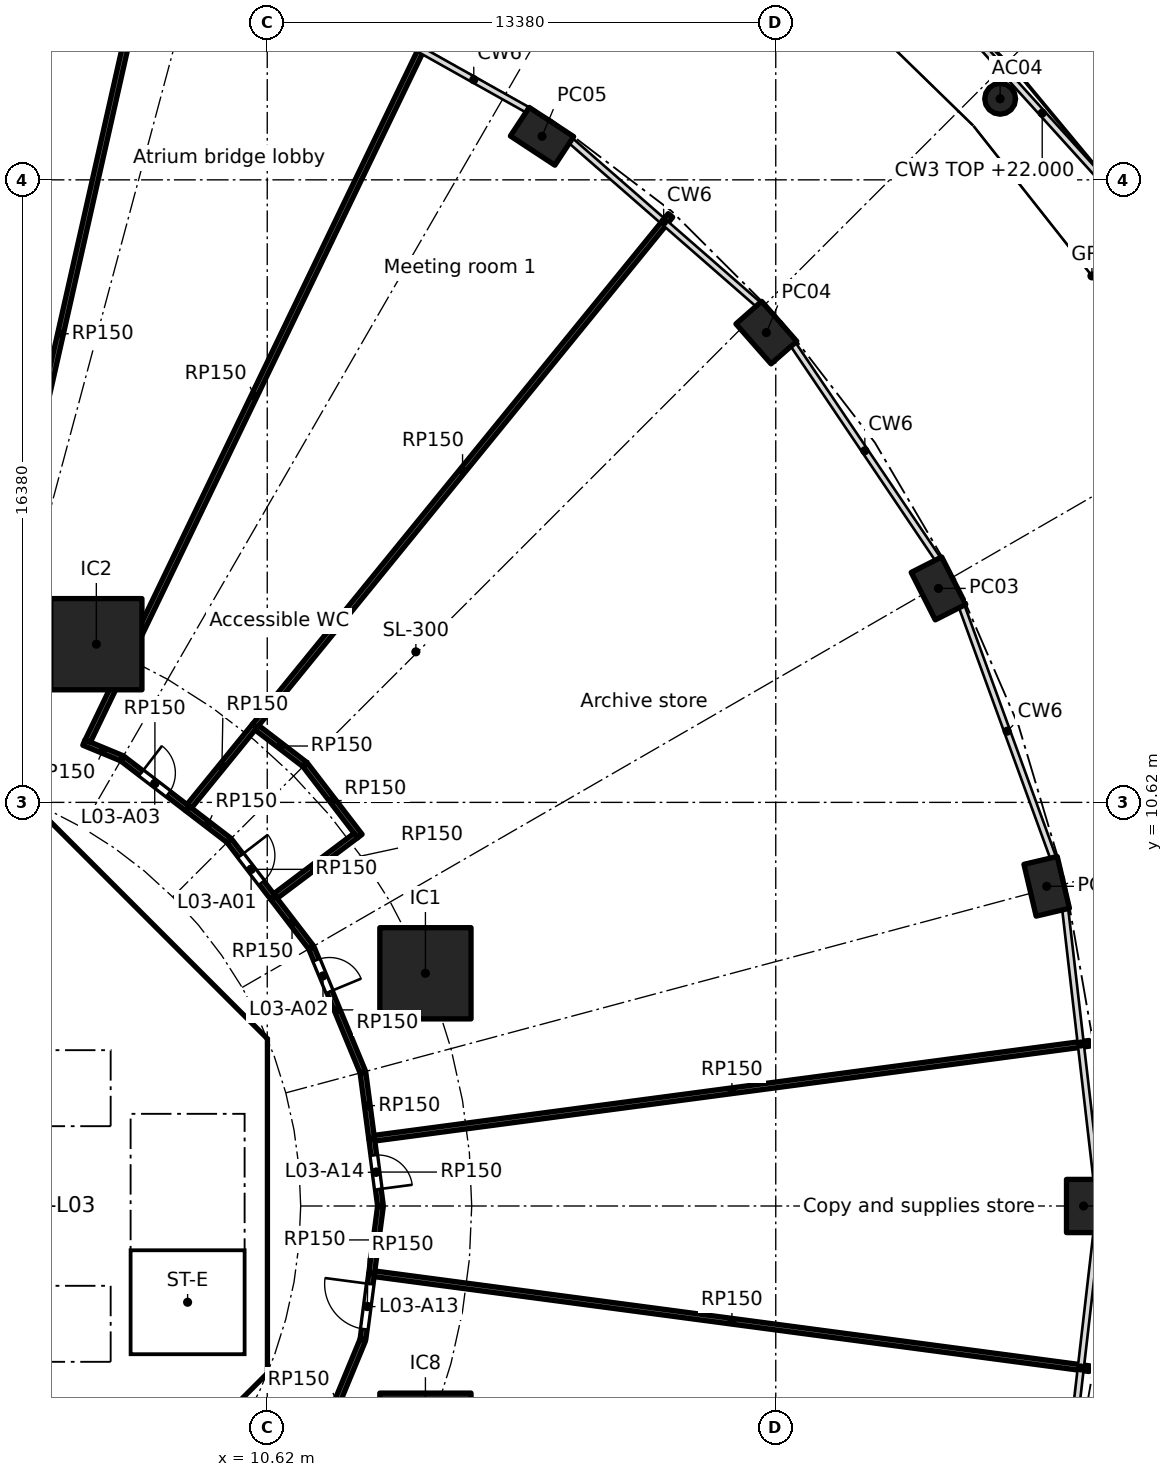
"""IFC4 building model, lengths in metres.
Left out: names, types, materials, properties, quantities, classifications, styles, units other than length and angle.
Written with IfcOpenShell. Run it as: python <this file> out.ifc"""

import sys

from ifc_helpers import new_model, si_unit, direction, frame, frame_2d, origin, origin_2d, place, context, subcontext, project, spatial, polyline, rectangle, hollow_rectangle, hollow_circle, outline, extrude, element, fill, save


model = new_model("IFC4")
c1 = context("Model", 3, precision=1e-05, world=origin(), true_north=direction((0.0, 1.0)))
c2 = subcontext(c1, "Body", "Model", "MODEL_VIEW")
j1 = project(units=[si_unit("LENGTHUNIT", "METRE"), si_unit("PLANEANGLEUNIT", "RADIAN")], contexts=[c1])
p1 = place(None, origin())
s1 = spatial("IfcSite", under=j1, at=p1, CompositionType="ELEMENT")
p2 = place(p1, origin())
s2 = spatial("IfcBuilding", under=s1, at=p2, CompositionType="ELEMENT")
p3 = place(p2, frame((0.0, 0.0, 17.0)))
s3 = spatial("IfcBuildingStorey", under=s2, at=p3, CompositionType="ELEMENT", Elevation=17.0)
for number, where, z_axis, x_axis in (
    (1, (32.1, 0.0, 0.0), (0.0, 0.0, 1.0), (0.0, 1.0, 0.0)),
    (2, (31.129, 8.412, 0.0), (0.0, 0.0, 1.0), (-0.229, 0.973, 0.0)),
    (3, (28.282, 16.25, 0.0), (0.0, 0.0, 1.0), (-0.452, 0.892, 0.0)),
    (4, (23.752, 22.981, 0.0), (0.0, 0.0, 1.0), (-0.66, 0.751, 0.0)),
    (5, (17.85, 28.146, 0.0), (0.0, 0.0, 1.0), (-0.836, 0.549, 0.0)),
):
    element("IfcColumn", number, at=place(p3, frame(where, z_axis=z_axis, x_axis=x_axis)), inside=s3, PredefinedType="COLUMN", context=c2, shape_type="SweptSolid", body=[
        extrude(hollow_rectangle(XDim=1.4, YDim=0.9, WallThickness=0.05, at=origin_2d()), origin(), (0.0, 0.0, 1.0), 5.0),
    ])
for number, where, z_axis, x_axis in (
    (6, (14.782, 6.123, 0.0), (0.0, 0.0, 1.0), (1.0, 0.0, 0.0)),
    (7, (6.123, 14.782, 0.0), (0.0, 0.0, 1.0), (1.0, 0.0, 0.0)),
    (8, (14.782, -6.123, 0.0), (0.0, 0.0, 1.0), (1.0, 0.0, 0.0)),
):
    element("IfcColumn", number, at=place(p3, frame(where, z_axis=z_axis, x_axis=x_axis)), inside=s3, PredefinedType="COLUMN", context=c2, shape_type="SweptSolid", body=[
        extrude(rectangle(XDim=2.4, YDim=2.4, at=origin_2d()), origin(), (0.0, 0.0, 1.0), 5.0),
    ])
p4 = place(p3, frame((29.904, 29.133, 0.0), z_axis=(0.0, 0.0, 1.0), x_axis=(1.0, 0.0, 0.0)))
e9 = element("IfcColumn", 9, at=p4, inside=s3, PredefinedType="COLUMN", context=c2, shape_type="SweptSolid", body=[
    extrude(hollow_circle(Radius=0.406, WallThickness=0.025, at=origin_2d()), origin(), (0.0, 0.0, 1.0), 5.0),
])
p5 = place(p3, frame((9.988, 4.613, 0.0), z_axis=(0.0, 0.0, 1.0), x_axis=(-0.707106781187, 0.707106781187, 0.0)))
e10 = element("IfcWall", 10, at=p5, inside=s3, PredefinedType="SHEAR", context=c2, shape_type="SweptSolid", body=[
    extrude(rectangle(XDim=7.602, YDim=0.6, at=frame_2d((3.801, 0.0))), origin(), (0.0, 0.0, 1.0), 4.7),
])
p6 = place(p5, frame((3.201, 0.0, 0.0)))
e11 = element("IfcOpeningElement", 11, at=p6, cuts=e10, PredefinedType="OPENING", context=c2, shape_type="SweptSolid", body=[
    extrude(rectangle(XDim=1.2, YDim=2.1, at=frame_2d((0.6, 1.05))), frame((0.0, 0.31, 0.0), z_axis=(0.0, -1.0, 0.0), x_axis=(1.0, 0.0, 0.0)), (0.0, 0.0, 1.0), 0.62),
])
p7 = place(p3, frame((4.613, -9.988, 0.0), z_axis=(0.0, 0.0, 1.0), x_axis=(0.707106781187, 0.707106781187, 0.0)))
e12 = element("IfcWall", 12, at=p7, inside=s3, PredefinedType="SHEAR", context=c2, shape_type="SweptSolid", body=[
    extrude(rectangle(XDim=7.602, YDim=0.6, at=frame_2d((3.801, 0.0))), origin(), (0.0, 0.0, 1.0), 4.7),
])
p8 = place(p7, frame((3.201, 0.0, 0.0)))
e13 = element("IfcOpeningElement", 13, at=p8, cuts=e12, PredefinedType="OPENING", context=c2, shape_type="SweptSolid", body=[
    extrude(rectangle(XDim=1.2, YDim=2.1, at=frame_2d((0.6, 1.05))), frame((0.0, 0.31, 0.0), z_axis=(0.0, -1.0, 0.0), x_axis=(1.0, 0.0, 0.0)), (0.0, 0.0, 1.0), 0.62),
])
p9 = place(p3, frame((-6.7, 2.0, 0.0), z_axis=(0.0, 0.0, 1.0), x_axis=(1.0, 0.0, 0.0)))
e14 = element("IfcWall", 14, at=p9, inside=s3, PredefinedType="SOLIDWALL", context=c2, shape_type="SweptSolid", body=[
    extrude(rectangle(XDim=13.4, YDim=0.2, at=frame_2d((6.7, 0.0))), origin(), (0.0, 0.0, 1.0), 4.7),
])
p10 = place(p9, frame((0.65, 0.0, 0.0)))
e15 = element("IfcOpeningElement", 15, at=p10, cuts=e14, PredefinedType="OPENING", context=c2, shape_type="SweptSolid", body=[
    extrude(rectangle(XDim=1.1, YDim=2.1, at=frame_2d((0.55, 1.05))), frame((0.0, 0.11, 0.0), z_axis=(0.0, -1.0, 0.0), x_axis=(1.0, 0.0, 0.0)), (0.0, 0.0, 1.0), 0.22),
])
p11 = place(p9, frame((2.85, 0.0, 0.0)))
e16 = element("IfcOpeningElement", 16, at=p11, cuts=e14, PredefinedType="OPENING", context=c2, shape_type="SweptSolid", body=[
    extrude(rectangle(XDim=1.1, YDim=2.1, at=frame_2d((0.55, 1.05))), frame((0.0, 0.11, 0.0), z_axis=(0.0, -1.0, 0.0), x_axis=(1.0, 0.0, 0.0)), (0.0, 0.0, 1.0), 0.22),
])
p12 = place(p9, frame((5.05, 0.0, 0.0)))
e17 = element("IfcOpeningElement", 17, at=p12, cuts=e14, PredefinedType="OPENING", context=c2, shape_type="SweptSolid", body=[
    extrude(rectangle(XDim=1.1, YDim=2.1, at=frame_2d((0.55, 1.05))), frame((0.0, 0.11, 0.0), z_axis=(0.0, -1.0, 0.0), x_axis=(1.0, 0.0, 0.0)), (0.0, 0.0, 1.0), 0.22),
])
p13 = place(p3, frame((6.7, 4.0, 0.0), z_axis=(0.0, 0.0, 1.0), x_axis=(1.0, 0.0, 0.0)))
e18 = element("IfcWall", 18, at=p13, inside=s3, PredefinedType="SOLIDWALL", context=c2, shape_type="SweptSolid", body=[
    extrude(rectangle(XDim=3.325, YDim=0.2, at=frame_2d((1.662, 0.0))), origin(), (0.0, 0.0, 1.0), 4.7),
])
p14 = place(p13, frame((1.25, 0.0, 0.0)))
e19 = element("IfcOpeningElement", 19, at=p14, cuts=e18, PredefinedType="OPENING", context=c2, shape_type="SweptSolid", body=[
    extrude(rectangle(XDim=1.1, YDim=2.1, at=frame_2d((0.55, 1.05))), frame((0.0, 0.11, 0.0), z_axis=(0.0, -1.0, 0.0), x_axis=(1.0, 0.0, 0.0)), (0.0, 0.0, 1.0), 0.22),
])
p15 = place(p3, frame((-6.7, -2.0, 0.0), z_axis=(0.0, 0.0, 1.0), x_axis=(1.0, 0.0, 0.0)))
e20 = element("IfcWall", 20, at=p15, inside=s3, PredefinedType="SOLIDWALL", context=c2, shape_type="SweptSolid", body=[
    extrude(rectangle(XDim=13.4, YDim=0.2, at=frame_2d((6.7, 0.0))), origin(), (0.0, 0.0, 1.0), 4.7),
])
p16 = place(p15, frame((0.65, 0.0, 0.0)))
e21 = element("IfcOpeningElement", 21, at=p16, cuts=e20, PredefinedType="OPENING", context=c2, shape_type="SweptSolid", body=[
    extrude(rectangle(XDim=1.1, YDim=2.1, at=frame_2d((0.55, 1.05))), frame((0.0, 0.11, 0.0), z_axis=(0.0, -1.0, 0.0), x_axis=(1.0, 0.0, 0.0)), (0.0, 0.0, 1.0), 0.22),
])
p17 = place(p15, frame((2.85, 0.0, 0.0)))
e22 = element("IfcOpeningElement", 22, at=p17, cuts=e20, PredefinedType="OPENING", context=c2, shape_type="SweptSolid", body=[
    extrude(rectangle(XDim=1.1, YDim=2.1, at=frame_2d((0.55, 1.05))), frame((0.0, 0.11, 0.0), z_axis=(0.0, -1.0, 0.0), x_axis=(1.0, 0.0, 0.0)), (0.0, 0.0, 1.0), 0.22),
])
p18 = place(p3, origin())
e23 = element("IfcWall", 23, at=p18, inside=s3, PredefinedType="SHEAR", context=c2, shape_type="SweptSolid", body=[
    extrude(outline(polyline([(9.776, -4.401), (10.025, -4.152), (10.025, -3.801), (10.025, 4.152), (9.776, 4.401), (10.2, 4.825), (10.625, 4.401), (10.625, -4.401), (10.2, -4.825), (9.776, -4.401)])), origin(), (0.0, 0.0, 1.0), 4.7),
])
p19 = place(p3, origin())
e24 = element("IfcWall", 24, at=p19, inside=s3, PredefinedType="SOLIDWALL", context=c2, shape_type="SweptSolid", body=[
    extrude(outline(polyline([(-6.7, -2.1), (-6.5, -2.1), (-6.5, -4.1), (-4.5, -4.1), (-4.5, -2.1), (-4.3, -2.1), (-4.3, -4.1), (-2.3, -4.1), (-2.3, -2.1), (-2.1, -2.1), (-2.1, -4.1), (-0.1, -4.1), (-0.1, -2.1), (0.1, -2.1), (0.1, -4.1), (2.1, -4.1), (2.1, -2.1), (2.3, -2.1), (2.3, -4.1), (4.3, -4.1), (4.3, -2.1), (4.5, -2.1), (4.5, -4.1), (6.5, -4.1), (6.5, -2.1), (6.7, -2.1), (6.7, -4.3), (-6.7, -4.3), (-6.7, -2.1)])), origin(), (0.0, 0.0, 1.0), 4.7),
])
p20 = place(p3, origin())
e25 = element("IfcWall", 25, at=p20, inside=s3, PredefinedType="SOLIDWALL", context=c2, shape_type="SweptSolid", body=[
    extrude(outline(polyline([(-6.5, 2.1), (-6.7, 2.1), (-6.7, 4.3), (6.7, 4.3), (6.7, 2.1), (6.5, 2.1), (6.5, 4.1), (4.5, 4.1), (4.5, 2.1), (4.3, 2.1), (4.3, 4.1), (2.3, 4.1), (2.3, 2.1), (2.1, 2.1), (2.1, 4.1), (0.1, 4.1), (0.1, 2.1), (-0.1, 2.1), (-0.1, 4.1), (-2.1, 4.1), (-2.1, 2.1), (-2.3, 2.1), (-2.3, 4.1), (-4.3, 4.1), (-4.3, 2.1), (-4.5, 2.1), (-4.5, 4.1), (-6.5, 4.1), (-6.5, 2.1)])), origin(), (0.0, 0.0, 1.0), 4.7),
])
p21 = place(p3, origin())
e26 = element("IfcWall", 26, at=p21, inside=s3, PredefinedType="SOLIDWALL", context=c2, shape_type="SweptSolid", body=[
    extrude(outline(polyline([(7.025, -3.9), (6.7, -3.9), (6.7, 3.9), (7.025, 3.9), (7.025, -3.9)])), origin(), (0.0, 0.0, 1.0), 4.7),
])
p22 = place(p3, origin())
e27 = element("IfcWall", 27, at=p22, inside=s3, PredefinedType="SOLIDWALL", context=c2, shape_type="SweptSolid", body=[
    extrude(outline(polyline([(10.025, -4.1), (6.7, -4.1), (6.7, -3.9), (10.025, -3.9), (10.025, -4.1)])), origin(), (0.0, 0.0, 1.0), 4.7),
])
p23 = place(p3, frame((2.998, 13.281, 0.0), z_axis=(0.0, 0.0, 1.0), x_axis=(0.220191699756, 0.975456618901, 0.0)))
e28 = element("IfcWall", 28, at=p23, inside=s3, PredefinedType="PARTITIONING", context=c2, shape_type="SweptSolid", body=[
    extrude(rectangle(XDim=19.825, YDim=0.15, at=frame_2d((9.912, 0.0))), origin(), (0.0, 0.0, 1.0), 4.7),
])
p24 = place(p3, frame((5.795, 12.194, 0.0), z_axis=(0.0, 0.0, 1.0), x_axis=(0.923867429555, -0.382712650179, 0.0)))
e29 = element("IfcWall", 29, at=p24, inside=s3, PredefinedType="PARTITIONING", context=c2, shape_type="SweptSolid", body=[
    extrude(rectangle(XDim=1.075, YDim=0.15, at=frame_2d((0.538, 0.0))), origin(), (0.0, 0.0, 1.0), 4.7),
])
p25 = place(p3, frame((6.809, 11.771, 0.0), z_axis=(0.0, 0.0, 1.0), x_axis=(0.793372937326, -0.608735888805, 0.0)))
e30 = element("IfcWall", 30, at=p25, inside=s3, PredefinedType="PARTITIONING", context=c2, shape_type="SweptSolid", body=[
    extrude(rectangle(XDim=2.155, YDim=0.15, at=frame_2d((1.078, 0.0))), origin(), (0.0, 0.0, 1.0), 4.7),
])
p26 = place(p25, frame((0.622, 0.0, 0.0)))
e31 = element("IfcOpeningElement", 31, at=p26, cuts=e30, PredefinedType="OPENING", context=c2, shape_type="SweptSolid", body=[
    extrude(rectangle(XDim=0.9, YDim=2.1, at=frame_2d((0.45, 1.05))), frame((0.0, 0.085, 0.0), z_axis=(0.0, -1.0, 0.0), x_axis=(1.0, 0.0, 0.0)), (0.0, 0.0, 1.0), 0.17),
])
p27 = place(p3, frame((8.519, 10.459, 0.0), z_axis=(0.0, 0.0, 1.0), x_axis=(0.793371316762, -0.6087380009, 0.0)))
e32 = element("IfcWall", 32, at=p27, inside=s3, PredefinedType="PARTITIONING", context=c2, shape_type="SweptSolid", body=[
    extrude(rectangle(XDim=1.371, YDim=0.15, at=frame_2d((0.686, 0.0))), origin(), (0.0, 0.0, 1.0), 4.7),
])
p28 = place(p3, frame((8.567, 10.517, 0.0), z_axis=(0.0, 0.0, 1.0), x_axis=(0.631573271363, 0.775316195432, 0.0)))
e33 = element("IfcWall", 33, at=p28, inside=s3, PredefinedType="PARTITIONING", context=c2, shape_type="SweptSolid", body=[
    extrude(rectangle(XDim=2.726, YDim=0.15, at=frame_2d((1.363, 0.0))), origin(), (0.0, 0.0, 1.0), 4.7),
])
p29 = place(p3, frame((9.624, 9.607, 0.0), z_axis=(0.0, 0.0, 1.0), x_axis=(0.608754453805, -0.793358692504, 0.0)))
e34 = element("IfcWall", 34, at=p29, inside=s3, PredefinedType="PARTITIONING", context=c2, shape_type="SweptSolid", body=[
    extrude(rectangle(XDim=1.888, YDim=0.15, at=frame_2d((0.944, 0.0))), origin(), (0.0, 0.0, 1.0), 4.7),
])
p30 = place(p29, frame((0.488, 0.0, 0.0)))
e35 = element("IfcOpeningElement", 35, at=p30, cuts=e34, PredefinedType="OPENING", context=c2, shape_type="SweptSolid", body=[
    extrude(rectangle(XDim=0.9, YDim=2.1, at=frame_2d((0.45, 1.05))), frame((0.0, 0.085, 0.0), z_axis=(0.0, -1.0, 0.0), x_axis=(1.0, 0.0, 0.0)), (0.0, 0.0, 1.0), 0.17),
])
p31 = place(p3, frame((10.348, 12.585, 0.0), z_axis=(0.0, 0.0, 1.0), x_axis=(0.793328373205, -0.608793965368, 0.0)))
e36 = element("IfcWall", 36, at=p31, inside=s3, PredefinedType="PARTITIONING", context=c2, shape_type="SweptSolid", body=[
    extrude(rectangle(XDim=1.584, YDim=0.15, at=frame_2d((0.792, 0.0))), origin(), (0.0, 0.0, 1.0), 4.7),
])
p32 = place(p3, frame((10.288, 12.631, 0.0), z_axis=(0.0, 0.0, 1.0), x_axis=(0.631546535922, 0.77533797338, 0.0)))
e37 = element("IfcWall", 37, at=p32, inside=s3, PredefinedType="PARTITIONING", context=c2, shape_type="SweptSolid", body=[
    extrude(rectangle(XDim=17.325, YDim=0.15, at=frame_2d((8.663, 0.0))), origin(), (0.0, 0.0, 1.0), 4.7),
])
p33 = place(p3, frame((10.774, 8.109, 0.0), z_axis=(0.0, 0.0, 1.0), x_axis=(0.608716251771, -0.793388003961, 0.0)))
e38 = element("IfcWall", 38, at=p33, inside=s3, PredefinedType="PARTITIONING", context=c2, shape_type="SweptSolid", body=[
    extrude(rectangle(XDim=1.638, YDim=0.15, at=frame_2d((0.819, 0.0))), origin(), (0.0, 0.0, 1.0), 4.7),
])
p34 = place(p3, frame((11.621, 11.604, 0.0), z_axis=(0.0, 0.0, 1.0), x_axis=(0.608759688573, -0.793354675771, 0.0)))
e39 = element("IfcWall", 39, at=p34, inside=s3, PredefinedType="PARTITIONING", context=c2, shape_type="SweptSolid", body=[
    extrude(rectangle(XDim=2.358, YDim=0.15, at=frame_2d((1.179, 0.0))), origin(), (0.0, 0.0, 1.0), 4.7),
])
p35 = place(p3, frame((11.782, 6.789, 0.0), z_axis=(0.0, 0.0, 1.0), x_axis=(0.382677866108, -0.923881838111, 0.0)))
e40 = element("IfcWall", 40, at=p35, inside=s3, PredefinedType="PARTITIONING", context=c2, shape_type="SweptSolid", body=[
    extrude(rectangle(XDim=3.527, YDim=0.15, at=frame_2d((1.763, 0.0))), origin(), (0.0, 0.0, 1.0), 4.7),
])
p36 = place(p35, frame((0.346, 0.0, 0.0)))
e41 = element("IfcOpeningElement", 41, at=p36, cuts=e40, PredefinedType="OPENING", context=c2, shape_type="SweptSolid", body=[
    extrude(rectangle(XDim=0.9, YDim=2.1, at=frame_2d((0.45, 1.05))), frame((0.0, 0.085, 0.0), z_axis=(0.0, -1.0, 0.0), x_axis=(1.0, 0.0, 0.0)), (0.0, 0.0, 1.0), 0.17),
])
p37 = place(p3, frame((12.951, 9.748, 0.0), z_axis=(0.0, 0.0, 1.0), x_axis=(-0.798970748419, -0.601369888813, 0.0)))
e42 = element("IfcWall", 42, at=p37, inside=s3, PredefinedType="PARTITIONING", context=c2, shape_type="SweptSolid", body=[
    extrude(rectangle(XDim=2.65, YDim=0.15, at=frame_2d((1.325, 0.0))), origin(), (0.0, 0.0, 1.0), 4.7),
])
p38 = place(p3, frame((13.132, -3.531, 0.0), z_axis=(0.0, 0.0, 1.0), x_axis=(-0.382677866108, -0.923881838111, 0.0)))
e43 = element("IfcWall", 43, at=p38, inside=s3, PredefinedType="PARTITIONING", context=c2, shape_type="SweptSolid", body=[
    extrude(rectangle(XDim=3.527, YDim=0.15, at=frame_2d((1.763, 0.0))), origin(), (0.0, 0.0, 1.0), 4.7),
])
p39 = place(p3, frame((13.138, 3.508, 0.0), z_axis=(0.0, 0.0, 1.0), x_axis=(0.130526735914, -0.991444789795, 0.0)))
e44 = element("IfcWall", 44, at=p39, inside=s3, PredefinedType="PARTITIONING", context=c2, shape_type="SweptSolid", body=[
    extrude(rectangle(XDim=1.749, YDim=0.15, at=frame_2d((0.875, 0.0))), origin(), (0.0, 0.0, 1.0), 4.7),
])
p40 = place(p3, frame((13.366, -1.774, 0.0), z_axis=(0.0, 0.0, 1.0), x_axis=(-0.130526735914, -0.991444789795, 0.0)))
e45 = element("IfcWall", 45, at=p40, inside=s3, PredefinedType="PARTITIONING", context=c2, shape_type="SweptSolid", body=[
    extrude(rectangle(XDim=1.749, YDim=0.15, at=frame_2d((0.875, 0.0))), origin(), (0.0, 0.0, 1.0), 4.7),
])
p41 = place(p40, frame((0.281, 0.0, 0.0)))
e46 = element("IfcOpeningElement", 46, at=p41, cuts=e45, PredefinedType="OPENING", context=c2, shape_type="SweptSolid", body=[
    extrude(rectangle(XDim=1.2, YDim=2.1, at=frame_2d((0.6, 1.05))), frame((0.0, 0.085, 0.0), z_axis=(0.0, -1.0, 0.0), x_axis=(1.0, 0.0, 0.0)), (0.0, 0.0, 1.0), 0.17),
])
p42 = place(p3, frame((13.441, -1.784, 0.0), z_axis=(0.0, 0.0, 1.0), x_axis=(0.991305479384, -0.131580570535, 0.0)))
e47 = element("IfcWall", 47, at=p42, inside=s3, PredefinedType="PARTITIONING", context=c2, shape_type="SweptSolid", body=[
    extrude(rectangle(XDim=18.978, YDim=0.15, at=frame_2d((9.489, 0.0))), origin(), (0.0, 0.0, 1.0), 4.7),
])
p43 = place(p3, frame((13.366, 1.774, 0.0), z_axis=(0.0, 0.0, 1.0), x_axis=(0.130472275964, -0.991451958092, 0.0)))
e48 = element("IfcWall", 48, at=p43, inside=s3, PredefinedType="PARTITIONING", context=c2, shape_type="SweptSolid", body=[
    extrude(rectangle(XDim=1.778, YDim=0.15, at=frame_2d((0.889, 0.0))), origin(), (0.0, 0.0, 1.0), 4.7),
])
p44 = place(p43, frame((0.445, 0.0, 0.0)))
e49 = element("IfcOpeningElement", 49, at=p44, cuts=e48, PredefinedType="OPENING", context=c2, shape_type="SweptSolid", body=[
    extrude(rectangle(XDim=0.9, YDim=2.1, at=frame_2d((0.45, 1.05))), frame((0.0, 0.085, 0.0), z_axis=(0.0, -1.0, 0.0), x_axis=(1.0, 0.0, 0.0)), (0.0, 0.0, 1.0), 0.17),
])
p45 = place(p3, frame((13.598, -0.012, 0.0), z_axis=(0.0, 0.0, 1.0), x_axis=(-0.130472275964, -0.991451958092, 0.0)))
e50 = element("IfcWall", 50, at=p45, inside=s3, PredefinedType="PARTITIONING", context=c2, shape_type="SweptSolid", body=[
    extrude(rectangle(XDim=1.778, YDim=0.15, at=frame_2d((0.889, 0.0))), origin(), (0.0, 0.0, 1.0), 4.7),
])
p46 = place(p3, frame((14.654, 30.398, 0.0), z_axis=(0.0, 0.0, 1.0), x_axis=(-0.434261119912, -0.900787033506, 0.0)))
e51 = element("IfcWall", 51, at=p46, inside=s3, PredefinedType="PARTITIONING", context=c2, shape_type="SweptSolid", body=[
    extrude(rectangle(XDim=20.166, YDim=0.15, at=frame_2d((10.083, 0.0))), origin(), (0.0, 0.0, 1.0), 4.7),
])
p47 = place(p3, frame((32.253, 4.281, 0.0), z_axis=(0.0, 0.0, 1.0), x_axis=(-0.991305479384, -0.131580570535, 0.0)))
e52 = element("IfcWall", 52, at=p47, inside=s3, PredefinedType="PARTITIONING", context=c2, shape_type="SweptSolid", body=[
    extrude(rectangle(XDim=18.978, YDim=0.15, at=frame_2d((9.489, 0.0))), origin(), (0.0, 0.0, 1.0), 4.7),
])
p48 = place(p14, frame((1.1, 0.0, 0.0), x_axis=(-1.0, 0.0, 0.0)))
e53 = element("IfcDoor", 53, at=p48, inside=s3, OperationType="SINGLE_SWING_RIGHT", PredefinedType="DOOR", context=c2, shape_type="SweptSolid", body=[
    extrude(rectangle(XDim=1.1, YDim=2.1, at=frame_2d((0.55, 1.05))), frame((0.0, 0.025, 0.0), z_axis=(0.0, -1.0, 0.0), x_axis=(1.0, 0.0, 0.0)), (0.0, 0.0, 1.0), 0.05),
])
fill(e19, e53)
p49 = place(p6, origin())
e54 = element("IfcDoor", 54, at=p49, inside=s3, OperationType="SINGLE_SWING_RIGHT", PredefinedType="DOOR", context=c2, shape_type="SweptSolid", body=[
    extrude(rectangle(XDim=1.2, YDim=2.1, at=frame_2d((0.6, 1.05))), frame((0.0, 0.025, 0.0), z_axis=(0.0, -1.0, 0.0), x_axis=(1.0, 0.0, 0.0)), (0.0, 0.0, 1.0), 0.05),
])
fill(e11, e54)
p50 = place(p30, origin())
e55 = element("IfcDoor", 55, at=p50, inside=s3, OperationType="SINGLE_SWING_LEFT", PredefinedType="DOOR", context=c2, shape_type="SweptSolid", body=[
    extrude(rectangle(XDim=0.9, YDim=2.1, at=frame_2d((0.45, 1.05))), frame((0.0, 0.025, 0.0), z_axis=(0.0, -1.0, 0.0), x_axis=(1.0, 0.0, 0.0)), (0.0, 0.0, 1.0), 0.05),
])
fill(e35, e55)
p51 = place(p36, origin())
e56 = element("IfcDoor", 56, at=p51, inside=s3, OperationType="SINGLE_SWING_RIGHT", PredefinedType="DOOR", context=c2, shape_type="SweptSolid", body=[
    extrude(rectangle(XDim=0.9, YDim=2.1, at=frame_2d((0.45, 1.05))), frame((0.0, 0.025, 0.0), z_axis=(0.0, -1.0, 0.0), x_axis=(1.0, 0.0, 0.0)), (0.0, 0.0, 1.0), 0.05),
])
fill(e41, e56)
p52 = place(p26, origin())
e57 = element("IfcDoor", 57, at=p52, inside=s3, OperationType="SINGLE_SWING_LEFT", PredefinedType="DOOR", context=c2, shape_type="SweptSolid", body=[
    extrude(rectangle(XDim=0.9, YDim=2.1, at=frame_2d((0.45, 1.05))), frame((0.0, 0.025, 0.0), z_axis=(0.0, -1.0, 0.0), x_axis=(1.0, 0.0, 0.0)), (0.0, 0.0, 1.0), 0.05),
])
fill(e31, e57)
p53 = place(p41, frame((1.2, 0.0, 0.0), x_axis=(-1.0, 0.0, 0.0)))
e58 = element("IfcDoor", 58, at=p53, inside=s3, OperationType="SINGLE_SWING_RIGHT", PredefinedType="DOOR", context=c2, shape_type="SweptSolid", body=[
    extrude(rectangle(XDim=1.2, YDim=2.1, at=frame_2d((0.6, 1.05))), frame((0.0, 0.025, 0.0), z_axis=(0.0, -1.0, 0.0), x_axis=(1.0, 0.0, 0.0)), (0.0, 0.0, 1.0), 0.05),
])
fill(e46, e58)
p54 = place(p44, origin())
e59 = element("IfcDoor", 59, at=p54, inside=s3, OperationType="SINGLE_SWING_RIGHT", PredefinedType="DOOR", context=c2, shape_type="SweptSolid", body=[
    extrude(rectangle(XDim=0.9, YDim=2.1, at=frame_2d((0.45, 1.05))), frame((0.0, 0.025, 0.0), z_axis=(0.0, -1.0, 0.0), x_axis=(1.0, 0.0, 0.0)), (0.0, 0.0, 1.0), 0.05),
])
fill(e49, e59)
save(model, sys.argv[1])
